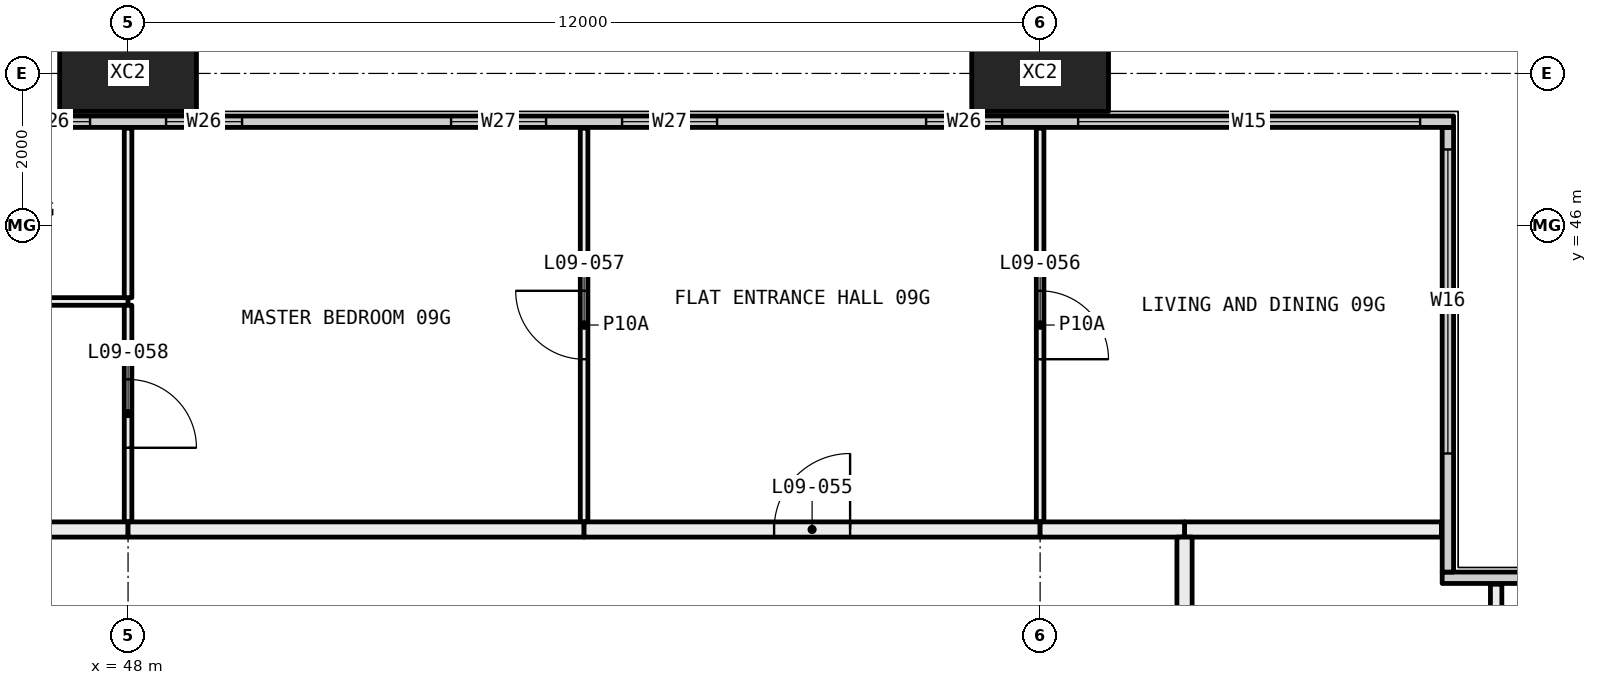
"""IFC4 building model, lengths in metres.
Left out: names, types, materials, properties, quantities, classifications, styles, units other than length and angle.
Written with IfcOpenShell. Run it as: python <this file> out.ifc"""

import sys

from ifc_helpers import new_model, si_unit, direction, frame, frame_2d, origin, origin_2d, place, context, subcontext, project, spatial, rectangle, hollow_rectangle, extrude, element, fill, save


model = new_model("IFC4")
c1 = context("Model", 3, precision=1e-05, world=origin(), true_north=direction((0.0, 1.0)))
c2 = subcontext(c1, "Body", "Model", "MODEL_VIEW")
j1 = project(units=[si_unit("LENGTHUNIT", "METRE"), si_unit("PLANEANGLEUNIT", "RADIAN")], contexts=[c1])
p1 = place(None, origin())
s1 = spatial("IfcSite", under=j1, at=p1, CompositionType="ELEMENT")
p2 = place(p1, origin())
s2 = spatial("IfcBuilding", under=s1, at=p2, CompositionType="ELEMENT")
p3 = place(p2, frame((0.0, 0.0, 43.8)))
s3 = spatial("IfcBuildingStorey", under=s2, at=p3, CompositionType="ELEMENT", Elevation=43.8)
for number, where, z_axis, x_axis in (
    (1, (48.0, 48.0, -0.4), (0.0, 0.0, 1.0), (1.0, 0.0, 0.0)),
    (2, (60.0, 48.0, -0.4), (0.0, 0.0, 1.0), (1.0, 0.0, 0.0)),
):
    element("IfcColumn", number, at=place(p3, frame(where, z_axis=z_axis, x_axis=x_axis)), inside=s3, PredefinedType="COLUMN", context=c2, shape_type="SweptSolid", body=[
        extrude(hollow_rectangle(XDim=1.8, YDim=1.0, WallThickness=0.07, at=origin_2d()), origin(), (0.0, 0.0, 1.0), 3.45),
    ])
p4 = place(p3, frame((65.29, 41.365, 0.0), z_axis=(0.0, 0.0, 1.0), x_axis=(1.0, 0.0, 0.0)))
e3 = element("IfcWall", 3, at=p4, inside=s3, PredefinedType="ELEMENTEDWALL", context=c2, shape_type="SweptSolid", body=[
    extrude(rectangle(XDim=6.15, YDim=0.15, at=frame_2d((3.075, 0.0))), origin(), (0.0, 0.0, 1.0), 3.05),
])
p5 = place(p4, frame((1.71, 0.0, 0.45)))
e4 = element("IfcOpeningElement", 4, at=p5, cuts=e3, PredefinedType="OPENING", context=c2, shape_type="SweptSolid", body=[
    extrude(rectangle(XDim=4.0, YDim=2.55, at=frame_2d((2.0, 1.275))), frame((0.0, 0.085, 0.0), z_axis=(0.0, -1.0, 0.0), x_axis=(1.0, 0.0, 0.0)), (0.0, 0.0, 1.0), 0.17),
])
p6 = place(p3, frame((65.365, 41.44, 0.0), z_axis=(0.0, 0.0, 1.0), x_axis=(0.0, 1.0, 0.0)))
e5 = element("IfcWall", 5, at=p6, inside=s3, PredefinedType="ELEMENTEDWALL", context=c2, shape_type="SweptSolid", body=[
    extrude(rectangle(XDim=5.85, YDim=0.15, at=frame_2d((2.925, 0.0))), origin(), (0.0, 0.0, 1.0), 3.05),
])
p7 = place(p6, frame((1.56, 0.0, 0.45)))
e6 = element("IfcOpeningElement", 6, at=p7, cuts=e5, PredefinedType="OPENING", context=c2, shape_type="SweptSolid", body=[
    extrude(rectangle(XDim=4.0, YDim=2.55, at=frame_2d((2.0, 1.275))), frame((0.0, 0.085, 0.0), z_axis=(0.0, -1.0, 0.0), x_axis=(1.0, 0.0, 0.0)), (0.0, 0.0, 1.0), 0.17),
])
p8 = place(p3, frame((6.56, 47.365, 0.0), z_axis=(0.0, 0.0, 1.0), x_axis=(1.0, 0.0, 0.0)))
e7 = element("IfcWall", 7, at=p8, inside=s3, PredefinedType="ELEMENTEDWALL", context=c2, shape_type="SweptSolid", body=[
    extrude(rectangle(XDim=58.88, YDim=0.15, at=frame_2d((29.44, 0.0))), origin(), (0.0, 0.0, 1.0), 3.05),
])
p9 = place(p8, frame((0.44, 0.0, 0.45)))
e8 = element("IfcOpeningElement", 8, at=p9, cuts=e7, PredefinedType="OPENING", context=c2, shape_type="SweptSolid", body=[
    extrude(rectangle(XDim=4.5, YDim=2.55, at=frame_2d((2.25, 1.275))), frame((0.0, 0.085, 0.0), z_axis=(0.0, -1.0, 0.0), x_axis=(1.0, 0.0, 0.0)), (0.0, 0.0, 1.0), 0.17),
])
p10 = place(p8, frame((5.94, 0.0, 0.45)))
e9 = element("IfcOpeningElement", 9, at=p10, cuts=e7, PredefinedType="OPENING", context=c2, shape_type="SweptSolid", body=[
    extrude(rectangle(XDim=1.0, YDim=2.55, at=frame_2d((0.5, 1.275))), frame((0.0, 0.085, 0.0), z_axis=(0.0, -1.0, 0.0), x_axis=(1.0, 0.0, 0.0)), (0.0, 0.0, 1.0), 0.17),
])
p11 = place(p8, frame((9.69, 0.0, 0.45)))
e10 = element("IfcOpeningElement", 10, at=p11, cuts=e7, PredefinedType="OPENING", context=c2, shape_type="SweptSolid", body=[
    extrude(rectangle(XDim=1.25, YDim=2.55, at=frame_2d((0.625, 1.275))), frame((0.0, 0.085, 0.0), z_axis=(0.0, -1.0, 0.0), x_axis=(1.0, 0.0, 0.0)), (0.0, 0.0, 1.0), 0.17),
])
p12 = place(p8, frame((11.94, 0.0, 0.45)))
e11 = element("IfcOpeningElement", 11, at=p12, cuts=e7, PredefinedType="OPENING", context=c2, shape_type="SweptSolid", body=[
    extrude(rectangle(XDim=1.25, YDim=2.55, at=frame_2d((0.625, 1.275))), frame((0.0, 0.085, 0.0), z_axis=(0.0, -1.0, 0.0), x_axis=(1.0, 0.0, 0.0)), (0.0, 0.0, 1.0), 0.17),
])
p13 = place(p8, frame((15.94, 0.0, 0.45)))
e12 = element("IfcOpeningElement", 12, at=p13, cuts=e7, PredefinedType="OPENING", context=c2, shape_type="SweptSolid", body=[
    extrude(rectangle(XDim=1.0, YDim=2.55, at=frame_2d((0.5, 1.275))), frame((0.0, 0.085, 0.0), z_axis=(0.0, -1.0, 0.0), x_axis=(1.0, 0.0, 0.0)), (0.0, 0.0, 1.0), 0.17),
])
p14 = place(p8, frame((17.94, 0.0, 0.45)))
e13 = element("IfcOpeningElement", 13, at=p14, cuts=e7, PredefinedType="OPENING", context=c2, shape_type="SweptSolid", body=[
    extrude(rectangle(XDim=1.0, YDim=2.55, at=frame_2d((0.5, 1.275))), frame((0.0, 0.085, 0.0), z_axis=(0.0, -1.0, 0.0), x_axis=(1.0, 0.0, 0.0)), (0.0, 0.0, 1.0), 0.17),
])
p15 = place(p8, frame((21.69, 0.0, 0.45)))
e14 = element("IfcOpeningElement", 14, at=p15, cuts=e7, PredefinedType="OPENING", context=c2, shape_type="SweptSolid", body=[
    extrude(rectangle(XDim=1.25, YDim=2.55, at=frame_2d((0.625, 1.275))), frame((0.0, 0.085, 0.0), z_axis=(0.0, -1.0, 0.0), x_axis=(1.0, 0.0, 0.0)), (0.0, 0.0, 1.0), 0.17),
])
p16 = place(p8, frame((23.94, 0.0, 0.45)))
e15 = element("IfcOpeningElement", 15, at=p16, cuts=e7, PredefinedType="OPENING", context=c2, shape_type="SweptSolid", body=[
    extrude(rectangle(XDim=1.25, YDim=2.55, at=frame_2d((0.625, 1.275))), frame((0.0, 0.085, 0.0), z_axis=(0.0, -1.0, 0.0), x_axis=(1.0, 0.0, 0.0)), (0.0, 0.0, 1.0), 0.17),
])
p17 = place(p8, frame((27.94, 0.0, 0.45)))
e16 = element("IfcOpeningElement", 16, at=p17, cuts=e7, PredefinedType="OPENING", context=c2, shape_type="SweptSolid", body=[
    extrude(rectangle(XDim=1.0, YDim=2.55, at=frame_2d((0.5, 1.275))), frame((0.0, 0.085, 0.0), z_axis=(0.0, -1.0, 0.0), x_axis=(1.0, 0.0, 0.0)), (0.0, 0.0, 1.0), 0.17),
])
p18 = place(p8, frame((29.94, 0.0, 0.45)))
e17 = element("IfcOpeningElement", 17, at=p18, cuts=e7, PredefinedType="OPENING", context=c2, shape_type="SweptSolid", body=[
    extrude(rectangle(XDim=1.0, YDim=2.55, at=frame_2d((0.5, 1.275))), frame((0.0, 0.085, 0.0), z_axis=(0.0, -1.0, 0.0), x_axis=(1.0, 0.0, 0.0)), (0.0, 0.0, 1.0), 0.17),
])
p19 = place(p8, frame((33.69, 0.0, 0.45)))
e18 = element("IfcOpeningElement", 18, at=p19, cuts=e7, PredefinedType="OPENING", context=c2, shape_type="SweptSolid", body=[
    extrude(rectangle(XDim=1.25, YDim=2.55, at=frame_2d((0.625, 1.275))), frame((0.0, 0.085, 0.0), z_axis=(0.0, -1.0, 0.0), x_axis=(1.0, 0.0, 0.0)), (0.0, 0.0, 1.0), 0.17),
])
p20 = place(p8, frame((35.94, 0.0, 0.45)))
e19 = element("IfcOpeningElement", 19, at=p20, cuts=e7, PredefinedType="OPENING", context=c2, shape_type="SweptSolid", body=[
    extrude(rectangle(XDim=1.25, YDim=2.55, at=frame_2d((0.625, 1.275))), frame((0.0, 0.085, 0.0), z_axis=(0.0, -1.0, 0.0), x_axis=(1.0, 0.0, 0.0)), (0.0, 0.0, 1.0), 0.17),
])
p21 = place(p8, frame((39.94, 0.0, 0.45)))
e20 = element("IfcOpeningElement", 20, at=p21, cuts=e7, PredefinedType="OPENING", context=c2, shape_type="SweptSolid", body=[
    extrude(rectangle(XDim=1.0, YDim=2.55, at=frame_2d((0.5, 1.275))), frame((0.0, 0.085, 0.0), z_axis=(0.0, -1.0, 0.0), x_axis=(1.0, 0.0, 0.0)), (0.0, 0.0, 1.0), 0.17),
])
p22 = place(p8, frame((41.94, 0.0, 0.45)))
e21 = element("IfcOpeningElement", 21, at=p22, cuts=e7, PredefinedType="OPENING", context=c2, shape_type="SweptSolid", body=[
    extrude(rectangle(XDim=1.0, YDim=2.55, at=frame_2d((0.5, 1.275))), frame((0.0, 0.085, 0.0), z_axis=(0.0, -1.0, 0.0), x_axis=(1.0, 0.0, 0.0)), (0.0, 0.0, 1.0), 0.17),
])
p23 = place(p8, frame((45.69, 0.0, 0.45)))
e22 = element("IfcOpeningElement", 22, at=p23, cuts=e7, PredefinedType="OPENING", context=c2, shape_type="SweptSolid", body=[
    extrude(rectangle(XDim=1.25, YDim=2.55, at=frame_2d((0.625, 1.275))), frame((0.0, 0.085, 0.0), z_axis=(0.0, -1.0, 0.0), x_axis=(1.0, 0.0, 0.0)), (0.0, 0.0, 1.0), 0.17),
])
p24 = place(p8, frame((47.94, 0.0, 0.45)))
e23 = element("IfcOpeningElement", 23, at=p24, cuts=e7, PredefinedType="OPENING", context=c2, shape_type="SweptSolid", body=[
    extrude(rectangle(XDim=1.25, YDim=2.55, at=frame_2d((0.625, 1.275))), frame((0.0, 0.085, 0.0), z_axis=(0.0, -1.0, 0.0), x_axis=(1.0, 0.0, 0.0)), (0.0, 0.0, 1.0), 0.17),
])
p25 = place(p8, frame((51.94, 0.0, 0.45)))
e24 = element("IfcOpeningElement", 24, at=p25, cuts=e7, PredefinedType="OPENING", context=c2, shape_type="SweptSolid", body=[
    extrude(rectangle(XDim=1.0, YDim=2.55, at=frame_2d((0.5, 1.275))), frame((0.0, 0.085, 0.0), z_axis=(0.0, -1.0, 0.0), x_axis=(1.0, 0.0, 0.0)), (0.0, 0.0, 1.0), 0.17),
])
p26 = place(p8, frame((53.94, 0.0, 0.45)))
e25 = element("IfcOpeningElement", 25, at=p26, cuts=e7, PredefinedType="OPENING", context=c2, shape_type="SweptSolid", body=[
    extrude(rectangle(XDim=4.5, YDim=2.55, at=frame_2d((2.25, 1.275))), frame((0.0, 0.085, 0.0), z_axis=(0.0, -1.0, 0.0), x_axis=(1.0, 0.0, 0.0)), (0.0, 0.0, 1.0), 0.17),
])
p27 = place(p3, frame((48.0, 45.0, 0.0), z_axis=(0.0, 0.0, 1.0), x_axis=(-1.0, 0.0, 0.0)))
e26 = element("IfcWall", 26, at=p27, inside=s3, PredefinedType="PARTITIONING", context=c2, shape_type="SweptSolid", body=[
    extrude(rectangle(XDim=11.925, YDim=0.1, at=frame_2d((5.962, 0.0))), origin(), (0.0, 0.0, 1.0), 2.45),
])
p28 = place(p27, frame((5.512, 0.0, 0.0)))
e27 = element("IfcOpeningElement", 27, at=p28, cuts=e26, PredefinedType="OPENING", context=c2, shape_type="SweptSolid", body=[
    extrude(rectangle(XDim=0.9, YDim=2.1, at=frame_2d((0.45, 1.05))), frame((0.0, 0.06, 0.0), z_axis=(0.0, -1.0, 0.0), x_axis=(1.0, 0.0, 0.0)), (0.0, 0.0, 1.0), 0.12),
])
p29 = place(p3, frame((48.0, 42.1, 0.0), z_axis=(0.0, 0.0, 1.0), x_axis=(0.0, 1.0, 0.0)))
e28 = element("IfcWall", 28, at=p29, inside=s3, PredefinedType="PARTITIONING", context=c2, shape_type="SweptSolid", body=[
    extrude(rectangle(XDim=2.85, YDim=0.1, at=frame_2d((1.425, 0.0))), origin(), (0.0, 0.0, 1.0), 3.05),
])
p30 = place(p29, frame((0.975, 0.0, 0.0)))
e29 = element("IfcOpeningElement", 29, at=p30, cuts=e28, PredefinedType="OPENING", context=c2, shape_type="SweptSolid", body=[
    extrude(rectangle(XDim=0.9, YDim=2.1, at=frame_2d((0.45, 1.05))), frame((0.0, 0.06, 0.0), z_axis=(0.0, -1.0, 0.0), x_axis=(1.0, 0.0, 0.0)), (0.0, 0.0, 1.0), 0.12),
])
p31 = place(p3, frame((46.1, 42.0, 0.0), z_axis=(0.0, 0.0, 1.0), x_axis=(1.0, 0.0, 0.0)))
e30 = element("IfcWall", 30, at=p31, inside=s3, PredefinedType="PARTITIONING", context=c2, shape_type="SweptSolid", body=[
    extrude(rectangle(XDim=1.9, YDim=0.2, at=frame_2d((0.95, 0.0))), origin(), (0.0, 0.0, 1.0), 3.05),
])
p32 = place(p3, frame((48.0, 45.05, 0.0), z_axis=(0.0, 0.0, 1.0), x_axis=(0.0, 1.0, 0.0)))
e31 = element("IfcWall", 31, at=p32, inside=s3, PredefinedType="PARTITIONING", context=c2, shape_type="SweptSolid", body=[
    extrude(rectangle(XDim=2.23, YDim=0.1, at=frame_2d((1.115, 0.0))), origin(), (0.0, 0.0, 1.0), 3.05),
])
p33 = place(p3, frame((54.0, 42.1, 0.0), z_axis=(0.0, 0.0, 1.0), x_axis=(0.0, 1.0, 0.0)))
e32 = element("IfcWall", 32, at=p33, inside=s3, PredefinedType="PARTITIONING", context=c2, shape_type="SweptSolid", body=[
    extrude(rectangle(XDim=5.18, YDim=0.1, at=frame_2d((2.59, 0.0))), origin(), (0.0, 0.0, 1.0), 3.05),
])
p34 = place(p33, frame((2.14, 0.0, 0.0)))
e33 = element("IfcOpeningElement", 33, at=p34, cuts=e32, PredefinedType="OPENING", context=c2, shape_type="SweptSolid", body=[
    extrude(rectangle(XDim=0.9, YDim=2.1, at=frame_2d((0.45, 1.05))), frame((0.0, 0.06, 0.0), z_axis=(0.0, -1.0, 0.0), x_axis=(1.0, 0.0, 0.0)), (0.0, 0.0, 1.0), 0.12),
])
p35 = place(p3, frame((48.0, 42.0, 0.0), z_axis=(0.0, 0.0, 1.0), x_axis=(1.0, 0.0, 0.0)))
e34 = element("IfcWall", 34, at=p35, inside=s3, PredefinedType="PARTITIONING", context=c2, shape_type="SweptSolid", body=[
    extrude(rectangle(XDim=6.0, YDim=0.2, at=frame_2d((3.0, 0.0))), origin(), (0.0, 0.0, 1.0), 3.05),
])
p36 = place(p3, frame((60.0, 42.1, 0.0), z_axis=(0.0, 0.0, 1.0), x_axis=(0.0, 1.0, 0.0)))
e35 = element("IfcWall", 35, at=p36, inside=s3, PredefinedType="PARTITIONING", context=c2, shape_type="SweptSolid", body=[
    extrude(rectangle(XDim=5.18, YDim=0.1, at=frame_2d((2.59, 0.0))), origin(), (0.0, 0.0, 1.0), 3.05),
])
p37 = place(p36, frame((2.14, 0.0, 0.0)))
e36 = element("IfcOpeningElement", 36, at=p37, cuts=e35, PredefinedType="OPENING", context=c2, shape_type="SweptSolid", body=[
    extrude(rectangle(XDim=0.9, YDim=2.1, at=frame_2d((0.45, 1.05))), frame((0.0, 0.06, 0.0), z_axis=(0.0, -1.0, 0.0), x_axis=(1.0, 0.0, 0.0)), (0.0, 0.0, 1.0), 0.12),
])
p38 = place(p3, frame((54.0, 42.0, 0.0), z_axis=(0.0, 0.0, 1.0), x_axis=(1.0, 0.0, 0.0)))
e37 = element("IfcWall", 37, at=p38, inside=s3, PredefinedType="PARTITIONING", context=c2, shape_type="SweptSolid", body=[
    extrude(rectangle(XDim=6.0, YDim=0.2, at=frame_2d((3.0, 0.0))), origin(), (0.0, 0.0, 1.0), 3.05),
])
p39 = place(p38, frame((2.5, 0.0, 0.0)))
e38 = element("IfcOpeningElement", 38, at=p39, cuts=e37, PredefinedType="OPENING", context=c2, shape_type="SweptSolid", body=[
    extrude(rectangle(XDim=1.0, YDim=2.1, at=frame_2d((0.5, 1.05))), frame((0.0, 0.11, 0.0), z_axis=(0.0, -1.0, 0.0), x_axis=(1.0, 0.0, 0.0)), (0.0, 0.0, 1.0), 0.22),
])
p40 = place(p3, frame((61.9, 42.0, 0.0), z_axis=(0.0, 0.0, 1.0), x_axis=(1.0, 0.0, 0.0)))
e39 = element("IfcWall", 39, at=p40, inside=s3, PredefinedType="PARTITIONING", context=c2, shape_type="SweptSolid", body=[
    extrude(rectangle(XDim=3.38, YDim=0.2, at=frame_2d((1.69, 0.0))), origin(), (0.0, 0.0, 1.0), 3.05),
])
p41 = place(p3, frame((60.0, 42.0, 0.0), z_axis=(0.0, 0.0, 1.0), x_axis=(1.0, 0.0, 0.0)))
e40 = element("IfcWall", 40, at=p41, inside=s3, PredefinedType="PARTITIONING", context=c2, shape_type="SweptSolid", body=[
    extrude(rectangle(XDim=1.9, YDim=0.2, at=frame_2d((0.95, 0.0))), origin(), (0.0, 0.0, 1.0), 3.05),
])
p42 = place(p3, frame((66.0, 41.28, 0.0), z_axis=(0.0, 0.0, 1.0), x_axis=(0.0, -1.0, 0.0)))
e41 = element("IfcWall", 41, at=p42, inside=s3, PredefinedType="PARTITIONING", context=c2, shape_type="SweptSolid", body=[
    extrude(rectangle(XDim=3.78, YDim=0.15, at=frame_2d((1.89, 0.0))), origin(), (0.0, 0.0, 1.0), 3.05),
])
p43 = place(p3, frame((61.9, 41.9, 0.0), z_axis=(0.0, 0.0, 1.0), x_axis=(0.0, -1.0, 0.0)))
e42 = element("IfcWall", 42, at=p43, inside=s3, PredefinedType="PARTITIONING", context=c2, shape_type="SweptSolid", body=[
    extrude(rectangle(XDim=4.4, YDim=0.2, at=frame_2d((2.2, 0.0))), origin(), (0.0, 0.0, 1.0), 3.05),
])
p44 = place(p7, origin())
e43 = element("IfcWindow", 43, at=p44, inside=s3, PartitioningType="SINGLE_PANEL", PredefinedType="WINDOW", context=c2, shape_type="SweptSolid", body=[
    extrude(rectangle(XDim=4.0, YDim=2.55, at=frame_2d((2.0, 1.275))), frame((0.0, 0.03, 0.0), z_axis=(0.0, -1.0, 0.0), x_axis=(1.0, 0.0, 0.0)), (0.0, 0.0, 1.0), 0.06),
])
fill(e6, e43)
p45 = place(p21, origin())
e44 = element("IfcWindow", 44, at=p45, inside=s3, PartitioningType="SINGLE_PANEL", PredefinedType="WINDOW", context=c2, shape_type="SweptSolid", body=[
    extrude(rectangle(XDim=1.0, YDim=2.55, at=frame_2d((0.5, 1.275))), frame((0.0, 0.03, 0.0), z_axis=(0.0, -1.0, 0.0), x_axis=(1.0, 0.0, 0.0)), (0.0, 0.0, 1.0), 0.06),
])
fill(e20, e44)
p46 = place(p22, origin())
e45 = element("IfcWindow", 45, at=p46, inside=s3, PartitioningType="SINGLE_PANEL", PredefinedType="WINDOW", context=c2, shape_type="SweptSolid", body=[
    extrude(rectangle(XDim=1.0, YDim=2.55, at=frame_2d((0.5, 1.275))), frame((0.0, 0.03, 0.0), z_axis=(0.0, -1.0, 0.0), x_axis=(1.0, 0.0, 0.0)), (0.0, 0.0, 1.0), 0.06),
])
fill(e21, e45)
p47 = place(p23, origin())
e46 = element("IfcWindow", 46, at=p47, inside=s3, PartitioningType="SINGLE_PANEL", PredefinedType="WINDOW", context=c2, shape_type="SweptSolid", body=[
    extrude(rectangle(XDim=1.25, YDim=2.55, at=frame_2d((0.625, 1.275))), frame((0.0, 0.03, 0.0), z_axis=(0.0, -1.0, 0.0), x_axis=(1.0, 0.0, 0.0)), (0.0, 0.0, 1.0), 0.06),
])
fill(e22, e46)
p48 = place(p24, origin())
e47 = element("IfcWindow", 47, at=p48, inside=s3, PartitioningType="SINGLE_PANEL", PredefinedType="WINDOW", context=c2, shape_type="SweptSolid", body=[
    extrude(rectangle(XDim=1.25, YDim=2.55, at=frame_2d((0.625, 1.275))), frame((0.0, 0.03, 0.0), z_axis=(0.0, -1.0, 0.0), x_axis=(1.0, 0.0, 0.0)), (0.0, 0.0, 1.0), 0.06),
])
fill(e23, e47)
p49 = place(p25, origin())
e48 = element("IfcWindow", 48, at=p49, inside=s3, PartitioningType="SINGLE_PANEL", PredefinedType="WINDOW", context=c2, shape_type="SweptSolid", body=[
    extrude(rectangle(XDim=1.0, YDim=2.55, at=frame_2d((0.5, 1.275))), frame((0.0, 0.03, 0.0), z_axis=(0.0, -1.0, 0.0), x_axis=(1.0, 0.0, 0.0)), (0.0, 0.0, 1.0), 0.06),
])
fill(e24, e48)
p50 = place(p26, origin())
e49 = element("IfcWindow", 49, at=p50, inside=s3, PartitioningType="SINGLE_PANEL", PredefinedType="WINDOW", context=c2, shape_type="SweptSolid", body=[
    extrude(rectangle(XDim=4.5, YDim=2.55, at=frame_2d((2.25, 1.275))), frame((0.0, 0.03, 0.0), z_axis=(0.0, -1.0, 0.0), x_axis=(1.0, 0.0, 0.0)), (0.0, 0.0, 1.0), 0.06),
])
fill(e25, e49)
p51 = place(p39, origin())
e50 = element("IfcDoor", 50, at=p51, inside=s3, OperationType="SINGLE_SWING_LEFT", PredefinedType="DOOR", context=c2, shape_type="SweptSolid", body=[
    extrude(rectangle(XDim=1.0, YDim=2.1, at=frame_2d((0.5, 1.05))), frame((0.0, 0.025, 0.0), z_axis=(0.0, -1.0, 0.0), x_axis=(1.0, 0.0, 0.0)), (0.0, 0.0, 1.0), 0.05),
])
fill(e38, e50)
p52 = place(p37, frame((0.9, 0.0, 0.0), x_axis=(-1.0, 0.0, 0.0)))
e51 = element("IfcDoor", 51, at=p52, inside=s3, OperationType="SINGLE_SWING_LEFT", PredefinedType="DOOR", context=c2, shape_type="SweptSolid", body=[
    extrude(rectangle(XDim=0.9, YDim=2.1, at=frame_2d((0.45, 1.05))), frame((0.0, 0.025, 0.0), z_axis=(0.0, -1.0, 0.0), x_axis=(1.0, 0.0, 0.0)), (0.0, 0.0, 1.0), 0.05),
])
fill(e36, e51)
p53 = place(p34, origin())
e52 = element("IfcDoor", 52, at=p53, inside=s3, OperationType="SINGLE_SWING_LEFT", PredefinedType="DOOR", context=c2, shape_type="SweptSolid", body=[
    extrude(rectangle(XDim=0.9, YDim=2.1, at=frame_2d((0.45, 1.05))), frame((0.0, 0.025, 0.0), z_axis=(0.0, -1.0, 0.0), x_axis=(1.0, 0.0, 0.0)), (0.0, 0.0, 1.0), 0.05),
])
fill(e33, e52)
p54 = place(p30, frame((0.9, 0.0, 0.0), x_axis=(-1.0, 0.0, 0.0)))
e53 = element("IfcDoor", 53, at=p54, inside=s3, OperationType="SINGLE_SWING_LEFT", PredefinedType="DOOR", context=c2, shape_type="SweptSolid", body=[
    extrude(rectangle(XDim=0.9, YDim=2.1, at=frame_2d((0.45, 1.05))), frame((0.0, 0.025, 0.0), z_axis=(0.0, -1.0, 0.0), x_axis=(1.0, 0.0, 0.0)), (0.0, 0.0, 1.0), 0.05),
])
fill(e29, e53)
save(model, sys.argv[1])
